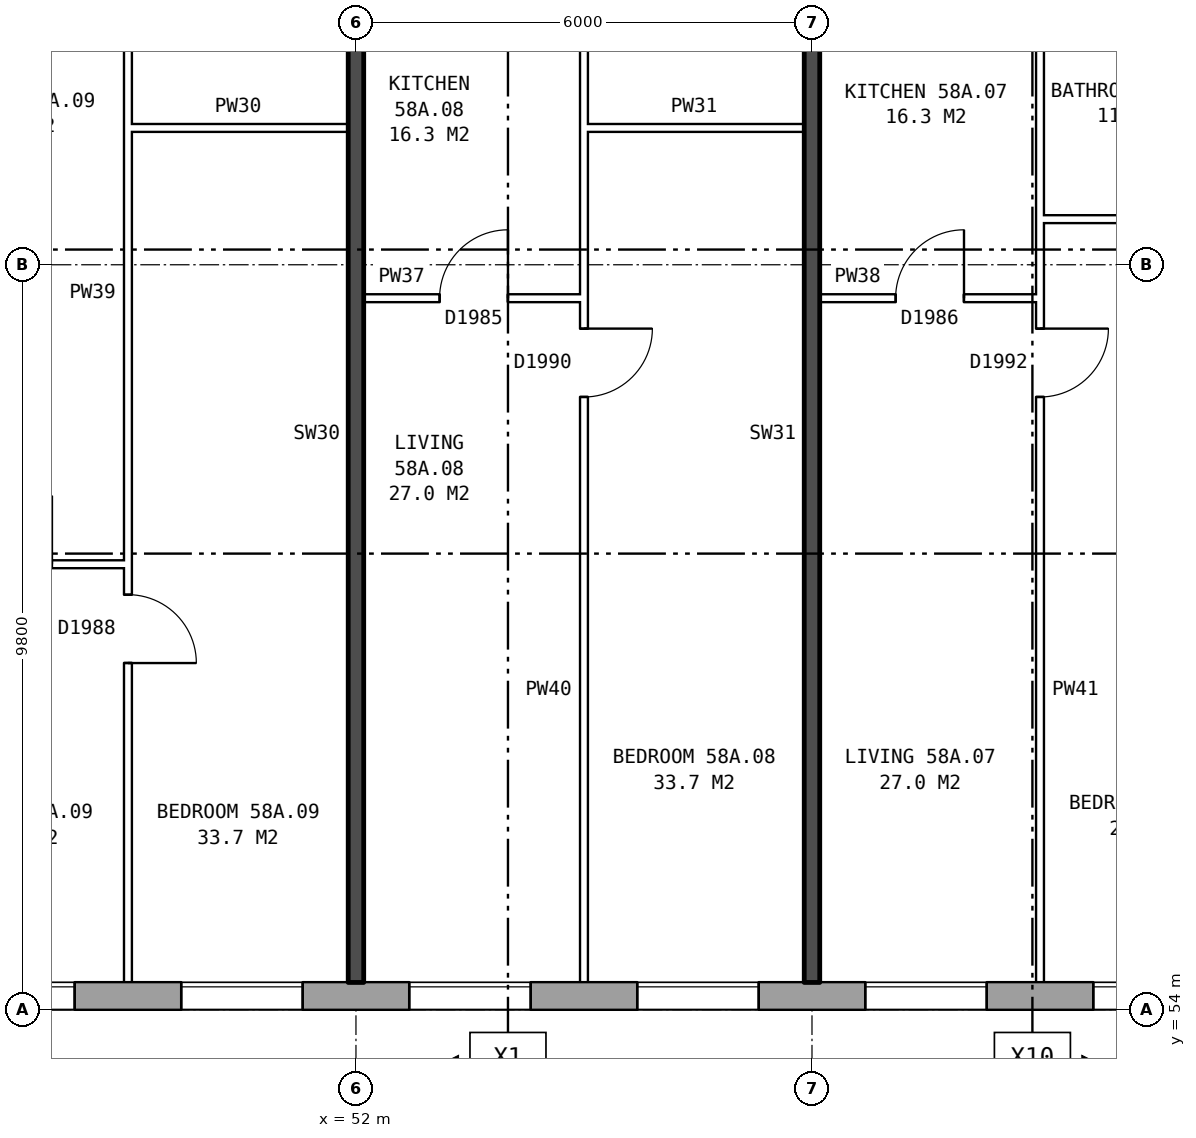
"""IFC4 building model, lengths in metres.
Left out: names, types, materials, properties, quantities, classifications, styles, units other than length and angle.
Written with IfcOpenShell. Run it as: python <this file> out.ifc"""

import sys

from ifc_helpers import new_model, si_unit, direction, frame, frame_2d, origin, place, context, subcontext, project, spatial, rectangle, extrude, element, fill, save


model = new_model("IFC4")
c1 = context("Model", 3, precision=1e-05, world=origin(), true_north=direction((0.0, 1.0)))
c2 = subcontext(c1, "Body", "Model", "MODEL_VIEW")
j1 = project(units=[si_unit("LENGTHUNIT", "METRE"), si_unit("PLANEANGLEUNIT", "RADIAN")], contexts=[c1])
p1 = place(None, origin())
s1 = spatial("IfcSite", under=j1, at=p1, CompositionType="ELEMENT")
p2 = place(p1, origin())
s2 = spatial("IfcBuilding", under=s1, at=p2, CompositionType="ELEMENT")
p3 = place(p2, frame((0.0, 0.0, 205.9)))
s3 = spatial("IfcBuildingStorey", under=s2, at=p3, CompositionType="ELEMENT", Elevation=205.9)
p4 = place(p3, frame((35.075, 54.18, 0.0), z_axis=(0.0, 0.0, 1.0), x_axis=(1.0, 0.0, 0.0)))
e1 = element("IfcWall", 1, at=p4, inside=s3, PredefinedType="STANDARD", context=c2, shape_type="SweptSolid", body=[
    extrude(rectangle(XDim=39.875, YDim=0.36, at=frame_2d((19.938, 0.0))), origin(), (0.0, 0.0, 1.0), 2.85),
])
p5 = place(p4, frame((2.625, 0.0, 0.8)))
e2 = element("IfcOpeningElement", 2, at=p5, cuts=e1, PredefinedType="OPENING", context=c2, shape_type="SweptSolid", body=[
    extrude(rectangle(XDim=1.6, YDim=1.8, at=frame_2d((0.8, 0.9))), frame((0.0, 0.19, 0.0), z_axis=(0.0, -1.0, 0.0), x_axis=(1.0, 0.0, 0.0)), (0.0, 0.0, 1.0), 0.38),
])
p6 = place(p4, frame((5.625, 0.0, 0.8)))
e3 = element("IfcOpeningElement", 3, at=p6, cuts=e1, PredefinedType="OPENING", context=c2, shape_type="SweptSolid", body=[
    extrude(rectangle(XDim=1.6, YDim=1.8, at=frame_2d((0.8, 0.9))), frame((0.0, 0.19, 0.0), z_axis=(0.0, -1.0, 0.0), x_axis=(1.0, 0.0, 0.0)), (0.0, 0.0, 1.0), 0.38),
])
p7 = place(p4, frame((8.625, 0.0, 0.8)))
e4 = element("IfcOpeningElement", 4, at=p7, cuts=e1, PredefinedType="OPENING", context=c2, shape_type="SweptSolid", body=[
    extrude(rectangle(XDim=1.6, YDim=1.8, at=frame_2d((0.8, 0.9))), frame((0.0, 0.19, 0.0), z_axis=(0.0, -1.0, 0.0), x_axis=(1.0, 0.0, 0.0)), (0.0, 0.0, 1.0), 0.38),
])
p8 = place(p4, frame((11.625, 0.0, 0.8)))
e5 = element("IfcOpeningElement", 5, at=p8, cuts=e1, PredefinedType="OPENING", context=c2, shape_type="SweptSolid", body=[
    extrude(rectangle(XDim=1.6, YDim=1.8, at=frame_2d((0.8, 0.9))), frame((0.0, 0.19, 0.0), z_axis=(0.0, -1.0, 0.0), x_axis=(1.0, 0.0, 0.0)), (0.0, 0.0, 1.0), 0.38),
])
p9 = place(p4, frame((14.625, 0.0, 0.8)))
e6 = element("IfcOpeningElement", 6, at=p9, cuts=e1, PredefinedType="OPENING", context=c2, shape_type="SweptSolid", body=[
    extrude(rectangle(XDim=1.6, YDim=1.8, at=frame_2d((0.8, 0.9))), frame((0.0, 0.19, 0.0), z_axis=(0.0, -1.0, 0.0), x_axis=(1.0, 0.0, 0.0)), (0.0, 0.0, 1.0), 0.38),
])
p10 = place(p4, frame((17.625, 0.0, 0.8)))
e7 = element("IfcOpeningElement", 7, at=p10, cuts=e1, PredefinedType="OPENING", context=c2, shape_type="SweptSolid", body=[
    extrude(rectangle(XDim=1.6, YDim=1.8, at=frame_2d((0.8, 0.9))), frame((0.0, 0.19, 0.0), z_axis=(0.0, -1.0, 0.0), x_axis=(1.0, 0.0, 0.0)), (0.0, 0.0, 1.0), 0.38),
])
p11 = place(p4, frame((20.625, 0.0, 0.8)))
e8 = element("IfcOpeningElement", 8, at=p11, cuts=e1, PredefinedType="OPENING", context=c2, shape_type="SweptSolid", body=[
    extrude(rectangle(XDim=1.6, YDim=1.8, at=frame_2d((0.8, 0.9))), frame((0.0, 0.19, 0.0), z_axis=(0.0, -1.0, 0.0), x_axis=(1.0, 0.0, 0.0)), (0.0, 0.0, 1.0), 0.38),
])
p12 = place(p4, frame((23.625, 0.0, 0.8)))
e9 = element("IfcOpeningElement", 9, at=p12, cuts=e1, PredefinedType="OPENING", context=c2, shape_type="SweptSolid", body=[
    extrude(rectangle(XDim=1.6, YDim=1.8, at=frame_2d((0.8, 0.9))), frame((0.0, 0.19, 0.0), z_axis=(0.0, -1.0, 0.0), x_axis=(1.0, 0.0, 0.0)), (0.0, 0.0, 1.0), 0.38),
])
p13 = place(p4, frame((26.625, 0.0, 0.8)))
e10 = element("IfcOpeningElement", 10, at=p13, cuts=e1, PredefinedType="OPENING", context=c2, shape_type="SweptSolid", body=[
    extrude(rectangle(XDim=1.6, YDim=1.8, at=frame_2d((0.8, 0.9))), frame((0.0, 0.19, 0.0), z_axis=(0.0, -1.0, 0.0), x_axis=(1.0, 0.0, 0.0)), (0.0, 0.0, 1.0), 0.38),
])
p14 = place(p4, frame((29.625, 0.0, 0.8)))
e11 = element("IfcOpeningElement", 11, at=p14, cuts=e1, PredefinedType="OPENING", context=c2, shape_type="SweptSolid", body=[
    extrude(rectangle(XDim=1.6, YDim=1.8, at=frame_2d((0.8, 0.9))), frame((0.0, 0.19, 0.0), z_axis=(0.0, -1.0, 0.0), x_axis=(1.0, 0.0, 0.0)), (0.0, 0.0, 1.0), 0.38),
])
p15 = place(p4, frame((32.625, 0.0, 0.8)))
e12 = element("IfcOpeningElement", 12, at=p15, cuts=e1, PredefinedType="OPENING", context=c2, shape_type="SweptSolid", body=[
    extrude(rectangle(XDim=1.6, YDim=1.8, at=frame_2d((0.8, 0.9))), frame((0.0, 0.19, 0.0), z_axis=(0.0, -1.0, 0.0), x_axis=(1.0, 0.0, 0.0)), (0.0, 0.0, 1.0), 0.38),
])
p16 = place(p4, frame((35.125, 0.0, 0.8)))
e13 = element("IfcOpeningElement", 13, at=p16, cuts=e1, PredefinedType="OPENING", context=c2, shape_type="SweptSolid", body=[
    extrude(rectangle(XDim=1.0, YDim=1.8, at=frame_2d((0.5, 0.9))), frame((0.0, 0.19, 0.0), z_axis=(0.0, -1.0, 0.0), x_axis=(1.0, 0.0, 0.0)), (0.0, 0.0, 1.0), 0.38),
])
p17 = place(p4, frame((38.475, 0.0, 0.8)))
e14 = element("IfcOpeningElement", 14, at=p17, cuts=e1, PredefinedType="OPENING", context=c2, shape_type="SweptSolid", body=[
    extrude(rectangle(XDim=1.0, YDim=1.8, at=frame_2d((0.5, 0.9))), frame((0.0, 0.19, 0.0), z_axis=(0.0, -1.0, 0.0), x_axis=(1.0, 0.0, 0.0)), (0.0, 0.0, 1.0), 0.38),
])
p18 = place(p3, frame((46.1, 59.86, 0.0), z_axis=(0.0, 0.0, 1.0), x_axis=(1.0, 0.0, 0.0)))
e15 = element("IfcWall", 15, at=p18, inside=s3, PredefinedType="PARTITIONING", context=c2, shape_type="SweptSolid", body=[
    extrude(rectangle(XDim=2.9, YDim=0.1, at=frame_2d((1.45, 0.0))), origin(), (0.0, 0.0, 1.0), 2.85),
])
p19 = place(p18, frame((1.0, 0.0, 0.0)))
e16 = element("IfcOpeningElement", 16, at=p19, cuts=e15, PredefinedType="OPENING", context=c2, shape_type="SweptSolid", body=[
    extrude(rectangle(XDim=0.9, YDim=2.1, at=frame_2d((0.45, 1.05))), frame((0.0, 0.06, 0.0), z_axis=(0.0, -1.0, 0.0), x_axis=(1.0, 0.0, 0.0)), (0.0, 0.0, 1.0), 0.12),
])
p20 = place(p3, frame((52.1, 63.36, 0.0), z_axis=(0.0, 0.0, 1.0), x_axis=(1.0, 0.0, 0.0)))
e17 = element("IfcWall", 17, at=p20, inside=s3, PredefinedType="PARTITIONING", context=c2, shape_type="SweptSolid", body=[
    extrude(rectangle(XDim=2.9, YDim=0.1, at=frame_2d((1.45, 0.0))), origin(), (0.0, 0.0, 1.0), 2.85),
])
p21 = place(p20, frame((1.0, 0.0, 0.0)))
e18 = element("IfcOpeningElement", 18, at=p21, cuts=e17, PredefinedType="OPENING", context=c2, shape_type="SweptSolid", body=[
    extrude(rectangle(XDim=0.9, YDim=2.1, at=frame_2d((0.45, 1.05))), frame((0.0, 0.06, 0.0), z_axis=(0.0, -1.0, 0.0), x_axis=(1.0, 0.0, 0.0)), (0.0, 0.0, 1.0), 0.12),
])
p22 = place(p3, frame((58.1, 63.36, 0.0), z_axis=(0.0, 0.0, 1.0), x_axis=(1.0, 0.0, 0.0)))
e19 = element("IfcWall", 19, at=p22, inside=s3, PredefinedType="PARTITIONING", context=c2, shape_type="SweptSolid", body=[
    extrude(rectangle(XDim=2.9, YDim=0.1, at=frame_2d((1.45, 0.0))), origin(), (0.0, 0.0, 1.0), 2.85),
])
p23 = place(p22, frame((1.0, 0.0, 0.0)))
e20 = element("IfcOpeningElement", 20, at=p23, cuts=e19, PredefinedType="OPENING", context=c2, shape_type="SweptSolid", body=[
    extrude(rectangle(XDim=0.9, YDim=2.1, at=frame_2d((0.45, 1.05))), frame((0.0, 0.06, 0.0), z_axis=(0.0, -1.0, 0.0), x_axis=(1.0, 0.0, 0.0)), (0.0, 0.0, 1.0), 0.12),
])
p24 = place(p3, frame((61.0, 64.4, 0.0), z_axis=(0.0, 0.0, 1.0), x_axis=(1.0, 0.0, 0.0)))
e21 = element("IfcWall", 21, at=p24, inside=s3, PredefinedType="PARTITIONING", context=c2, shape_type="SweptSolid", body=[
    extrude(rectangle(XDim=2.64, YDim=0.1, at=frame_2d((1.32, 0.0))), origin(), (0.0, 0.0, 1.0), 2.85),
])
for number, where, z_axis, x_axis in (
    (22, (49.0, 65.6, 0.0), (0.0, 0.0, 1.0), (1.0, 0.0, 0.0)),
    (23, (55.0, 65.6, 0.0), (0.0, 0.0, 1.0), (1.0, 0.0, 0.0)),
):
    element("IfcWall", number, at=place(p3, frame(where, z_axis=z_axis, x_axis=x_axis)), inside=s3, PredefinedType="PARTITIONING", context=c2, shape_type="SweptSolid", body=[
        extrude(rectangle(XDim=2.9, YDim=0.1, at=frame_2d((1.45, 0.0))), origin(), (0.0, 0.0, 1.0), 2.85),
    ])
p25 = place(p3, frame((49.0, 54.36, 0.0), z_axis=(0.0, 0.0, 1.0), x_axis=(0.0, 1.0, 0.0)))
e24 = element("IfcWall", 24, at=p25, inside=s3, PredefinedType="PARTITIONING", context=c2, shape_type="SweptSolid", body=[
    extrude(rectangle(XDim=14.34, YDim=0.1, at=frame_2d((7.17, 0.0))), origin(), (0.0, 0.0, 1.0), 2.85),
])
p26 = place(p25, frame((4.2, 0.0, 0.0)))
e25 = element("IfcOpeningElement", 25, at=p26, cuts=e24, PredefinedType="OPENING", context=c2, shape_type="SweptSolid", body=[
    extrude(rectangle(XDim=0.9, YDim=2.1, at=frame_2d((0.45, 1.05))), frame((0.0, 0.06, 0.0), z_axis=(0.0, -1.0, 0.0), x_axis=(1.0, 0.0, 0.0)), (0.0, 0.0, 1.0), 0.12),
])
p27 = place(p25, frame((13.04, 0.0, 0.0)))
e26 = element("IfcOpeningElement", 26, at=p27, cuts=e24, PredefinedType="OPENING", context=c2, shape_type="SweptSolid", body=[
    extrude(rectangle(XDim=0.9, YDim=2.1, at=frame_2d((0.45, 1.05))), frame((0.0, 0.06, 0.0), z_axis=(0.0, -1.0, 0.0), x_axis=(1.0, 0.0, 0.0)), (0.0, 0.0, 1.0), 0.12),
])
p28 = place(p3, frame((52.0, 54.36, 0.0), z_axis=(0.0, 0.0, 1.0), x_axis=(0.0, 1.0, 0.0)))
e27 = element("IfcWall", 27, at=p28, inside=s3, PredefinedType="SOLIDWALL", context=c2, shape_type="SweptSolid", body=[
    extrude(rectangle(XDim=14.44, YDim=0.2, at=frame_2d((7.22, 0.0))), origin(), (0.0, 0.0, 1.0), 2.85),
])
p29 = place(p3, frame((55.0, 54.36, 0.0), z_axis=(0.0, 0.0, 1.0), x_axis=(0.0, 1.0, 0.0)))
e28 = element("IfcWall", 28, at=p29, inside=s3, PredefinedType="PARTITIONING", context=c2, shape_type="SweptSolid", body=[
    extrude(rectangle(XDim=14.34, YDim=0.1, at=frame_2d((7.17, 0.0))), origin(), (0.0, 0.0, 1.0), 2.85),
])
p30 = place(p29, frame((7.7, 0.0, 0.0)))
e29 = element("IfcOpeningElement", 29, at=p30, cuts=e28, PredefinedType="OPENING", context=c2, shape_type="SweptSolid", body=[
    extrude(rectangle(XDim=0.9, YDim=2.1, at=frame_2d((0.45, 1.05))), frame((0.0, 0.06, 0.0), z_axis=(0.0, -1.0, 0.0), x_axis=(1.0, 0.0, 0.0)), (0.0, 0.0, 1.0), 0.12),
])
p31 = place(p29, frame((13.04, 0.0, 0.0)))
e30 = element("IfcOpeningElement", 30, at=p31, cuts=e28, PredefinedType="OPENING", context=c2, shape_type="SweptSolid", body=[
    extrude(rectangle(XDim=0.9, YDim=2.1, at=frame_2d((0.45, 1.05))), frame((0.0, 0.06, 0.0), z_axis=(0.0, -1.0, 0.0), x_axis=(1.0, 0.0, 0.0)), (0.0, 0.0, 1.0), 0.12),
])
p32 = place(p3, frame((58.0, 54.36, 0.0), z_axis=(0.0, 0.0, 1.0), x_axis=(0.0, 1.0, 0.0)))
e31 = element("IfcWall", 31, at=p32, inside=s3, PredefinedType="SOLIDWALL", context=c2, shape_type="SweptSolid", body=[
    extrude(rectangle(XDim=14.44, YDim=0.2, at=frame_2d((7.22, 0.0))), origin(), (0.0, 0.0, 1.0), 2.85),
])
p33 = place(p3, frame((61.0, 54.36, 0.0), z_axis=(0.0, 0.0, 1.0), x_axis=(0.0, 1.0, 0.0)))
e32 = element("IfcWall", 32, at=p33, inside=s3, PredefinedType="PARTITIONING", context=c2, shape_type="SweptSolid", body=[
    extrude(rectangle(XDim=14.34, YDim=0.1, at=frame_2d((7.17, 0.0))), origin(), (0.0, 0.0, 1.0), 2.85),
])
p34 = place(p33, frame((7.7, 0.0, 0.0)))
e33 = element("IfcOpeningElement", 33, at=p34, cuts=e32, PredefinedType="OPENING", context=c2, shape_type="SweptSolid", body=[
    extrude(rectangle(XDim=0.9, YDim=2.1, at=frame_2d((0.45, 1.05))), frame((0.0, 0.06, 0.0), z_axis=(0.0, -1.0, 0.0), x_axis=(1.0, 0.0, 0.0)), (0.0, 0.0, 1.0), 0.12),
])
p35 = place(p33, frame((13.04, 0.0, 0.0)))
e34 = element("IfcOpeningElement", 34, at=p35, cuts=e32, PredefinedType="OPENING", context=c2, shape_type="SweptSolid", body=[
    extrude(rectangle(XDim=0.9, YDim=2.1, at=frame_2d((0.45, 1.05))), frame((0.0, 0.06, 0.0), z_axis=(0.0, -1.0, 0.0), x_axis=(1.0, 0.0, 0.0)), (0.0, 0.0, 1.0), 0.12),
])
p36 = place(p8, origin())
e35 = element("IfcWindow", 35, at=p36, inside=s3, PartitioningType="SINGLE_PANEL", PredefinedType="WINDOW", context=c2, shape_type="SweptSolid", body=[
    extrude(rectangle(XDim=1.6, YDim=1.8, at=frame_2d((0.8, 0.9))), frame((0.0, 0.15, 0.0), z_axis=(0.0, -1.0, 0.0), x_axis=(1.0, 0.0, 0.0)), (0.0, 0.0, 1.0), 0.06),
])
fill(e5, e35)
p37 = place(p9, origin())
e36 = element("IfcWindow", 36, at=p37, inside=s3, PartitioningType="SINGLE_PANEL", PredefinedType="WINDOW", context=c2, shape_type="SweptSolid", body=[
    extrude(rectangle(XDim=1.6, YDim=1.8, at=frame_2d((0.8, 0.9))), frame((0.0, 0.15, 0.0), z_axis=(0.0, -1.0, 0.0), x_axis=(1.0, 0.0, 0.0)), (0.0, 0.0, 1.0), 0.06),
])
fill(e6, e36)
p38 = place(p10, origin())
e37 = element("IfcWindow", 37, at=p38, inside=s3, PartitioningType="SINGLE_PANEL", PredefinedType="WINDOW", context=c2, shape_type="SweptSolid", body=[
    extrude(rectangle(XDim=1.6, YDim=1.8, at=frame_2d((0.8, 0.9))), frame((0.0, 0.15, 0.0), z_axis=(0.0, -1.0, 0.0), x_axis=(1.0, 0.0, 0.0)), (0.0, 0.0, 1.0), 0.06),
])
fill(e7, e37)
p39 = place(p11, origin())
e38 = element("IfcWindow", 38, at=p39, inside=s3, PartitioningType="SINGLE_PANEL", PredefinedType="WINDOW", context=c2, shape_type="SweptSolid", body=[
    extrude(rectangle(XDim=1.6, YDim=1.8, at=frame_2d((0.8, 0.9))), frame((0.0, 0.15, 0.0), z_axis=(0.0, -1.0, 0.0), x_axis=(1.0, 0.0, 0.0)), (0.0, 0.0, 1.0), 0.06),
])
fill(e8, e38)
p40 = place(p12, origin())
e39 = element("IfcWindow", 39, at=p40, inside=s3, PartitioningType="SINGLE_PANEL", PredefinedType="WINDOW", context=c2, shape_type="SweptSolid", body=[
    extrude(rectangle(XDim=1.6, YDim=1.8, at=frame_2d((0.8, 0.9))), frame((0.0, 0.15, 0.0), z_axis=(0.0, -1.0, 0.0), x_axis=(1.0, 0.0, 0.0)), (0.0, 0.0, 1.0), 0.06),
])
fill(e9, e39)
p41 = place(p13, origin())
e40 = element("IfcWindow", 40, at=p41, inside=s3, PartitioningType="SINGLE_PANEL", PredefinedType="WINDOW", context=c2, shape_type="SweptSolid", body=[
    extrude(rectangle(XDim=1.6, YDim=1.8, at=frame_2d((0.8, 0.9))), frame((0.0, 0.15, 0.0), z_axis=(0.0, -1.0, 0.0), x_axis=(1.0, 0.0, 0.0)), (0.0, 0.0, 1.0), 0.06),
])
fill(e10, e40)
p42 = place(p34, frame((0.9, 0.0, 0.0), z_axis=(0.0, 0.0, 1.0), x_axis=(-1.0, 0.0, 0.0)))
e41 = element("IfcDoor", 41, at=p42, inside=s3, OperationType="SINGLE_SWING_LEFT", PredefinedType="DOOR", context=c2, shape_type="SweptSolid", body=[
    extrude(rectangle(XDim=0.9, YDim=2.1, at=frame_2d((0.45, 1.05))), frame((0.0, 0.025, 0.0), z_axis=(0.0, -1.0, 0.0), x_axis=(1.0, 0.0, 0.0)), (0.0, 0.0, 1.0), 0.05),
])
fill(e33, e41)
p43 = place(p23, origin())
e42 = element("IfcDoor", 42, at=p43, inside=s3, OperationType="SINGLE_SWING_RIGHT", PredefinedType="DOOR", context=c2, shape_type="SweptSolid", body=[
    extrude(rectangle(XDim=0.9, YDim=2.1, at=frame_2d((0.45, 1.05))), frame((0.0, 0.025, 0.0), z_axis=(0.0, -1.0, 0.0), x_axis=(1.0, 0.0, 0.0)), (0.0, 0.0, 1.0), 0.05),
])
fill(e20, e42)
p44 = place(p30, frame((0.9, 0.0, 0.0), z_axis=(0.0, 0.0, 1.0), x_axis=(-1.0, 0.0, 0.0)))
e43 = element("IfcDoor", 43, at=p44, inside=s3, OperationType="SINGLE_SWING_LEFT", PredefinedType="DOOR", context=c2, shape_type="SweptSolid", body=[
    extrude(rectangle(XDim=0.9, YDim=2.1, at=frame_2d((0.45, 1.05))), frame((0.0, 0.025, 0.0), z_axis=(0.0, -1.0, 0.0), x_axis=(1.0, 0.0, 0.0)), (0.0, 0.0, 1.0), 0.05),
])
fill(e29, e43)
p45 = place(p21, origin())
e44 = element("IfcDoor", 44, at=p45, inside=s3, OperationType="SINGLE_SWING_RIGHT", PredefinedType="DOOR", context=c2, shape_type="SweptSolid", body=[
    extrude(rectangle(XDim=0.9, YDim=2.1, at=frame_2d((0.45, 1.05))), frame((0.0, 0.025, 0.0), z_axis=(0.0, -1.0, 0.0), x_axis=(1.0, 0.0, 0.0)), (0.0, 0.0, 1.0), 0.05),
])
fill(e18, e44)
p46 = place(p26, frame((0.9, 0.0, 0.0), z_axis=(0.0, 0.0, 1.0), x_axis=(-1.0, 0.0, 0.0)))
e45 = element("IfcDoor", 45, at=p46, inside=s3, OperationType="SINGLE_SWING_RIGHT", PredefinedType="DOOR", context=c2, shape_type="SweptSolid", body=[
    extrude(rectangle(XDim=0.9, YDim=2.1, at=frame_2d((0.45, 1.05))), frame((0.0, 0.025, 0.0), z_axis=(0.0, -1.0, 0.0), x_axis=(1.0, 0.0, 0.0)), (0.0, 0.0, 1.0), 0.05),
])
fill(e25, e45)
save(model, sys.argv[1])
